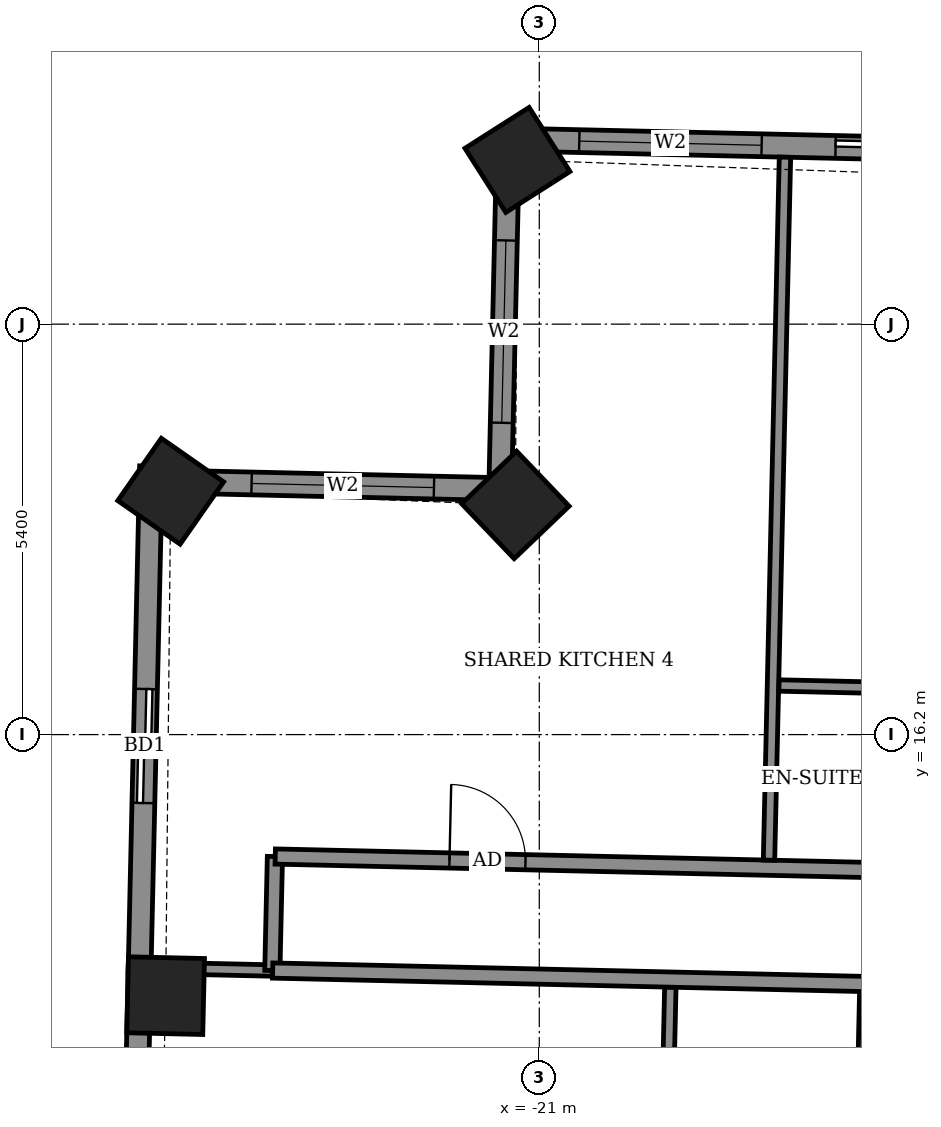
"""IFC4 building model, lengths in metres.
Left out: names, types, materials, properties, quantities, classifications, styles, units other than length and angle.
Written with IfcOpenShell. Run it as: python <this file> out.ifc"""

import sys

from ifc_helpers import new_model, si_unit, direction, frame, frame_2d, origin, origin_2d, place, context, subcontext, project, spatial, rectangle, extrude, element, fill, save


model = new_model("IFC4")
c1 = context("Model", 3, precision=1e-05, world=origin(), true_north=direction((0.0, 1.0)))
c2 = subcontext(c1, "Body", "Model", "MODEL_VIEW")
j1 = project(units=[si_unit("LENGTHUNIT", "METRE"), si_unit("PLANEANGLEUNIT", "RADIAN")], contexts=[c1])
p1 = place(None, origin())
s1 = spatial("IfcSite", under=j1, at=p1, CompositionType="ELEMENT")
p2 = place(p1, origin())
s2 = spatial("IfcBuilding", under=s1, at=p2, CompositionType="ELEMENT")
p3 = place(p2, frame((0.0, 0.0, 271.7)))
s3 = spatial("IfcBuildingStorey", under=s2, at=p3, CompositionType="ELEMENT", Elevation=271.7)
for number, where, z_axis, x_axis in (
    (1, (-21.287, 23.76, -0.55), (0.0, 0.0, 1.0), (-0.843, -0.538, 0.0)),
    (2, (-21.314, 19.221, -0.55), (0.0, 0.0, 1.0), (-0.723, -0.691, 0.0)),
    (3, (-25.849, 19.402, -0.55), (0.0, 0.0, 1.0), (-0.573, -0.82, 0.0)),
    (4, (-25.916, 12.766, -0.55), (0.0, 0.0, 1.0), (-0.023, -1.0, 0.0)),
):
    element("IfcColumn", number, at=place(p3, frame(where, z_axis=z_axis, x_axis=x_axis)), inside=s3, PredefinedType="COLUMN", context=c2, shape_type="SweptSolid", body=[
        extrude(rectangle(XDim=1.0, YDim=1.0, at=origin_2d()), origin(), (0.0, 0.0, 1.0), 3.6),
    ])
p4 = place(p3, frame((26.35, 22.945, 0.0), z_axis=(0.0, 0.0, 1.0), x_axis=(-0.999742523712, 0.022691105788, 0.0)))
e5 = element("IfcWall", 5, at=p4, inside=s3, PredefinedType="SOLIDWALL", context=c2, shape_type="SweptSolid", body=[
    extrude(rectangle(XDim=47.771, YDim=0.3, at=frame_2d((23.886, 0.0))), origin(), (0.0, 0.0, 1.0), 2.55),
])
p5 = place(p4, frame((1.954, 0.0, 0.0)))
e6 = element("IfcOpeningElement", 6, at=p5, cuts=e5, PredefinedType="OPENING", context=c2, shape_type="SweptSolid", body=[
    extrude(rectangle(XDim=1.5, YDim=2.4, at=frame_2d((0.75, 1.2))), frame((0.0, 0.16, 0.0), z_axis=(0.0, -1.0, 0.0), x_axis=(1.0, 0.0, 0.0)), (0.0, 0.0, 1.0), 0.32),
])
p6 = place(p4, frame((7.37, 0.0, 0.0)))
e7 = element("IfcOpeningElement", 7, at=p6, cuts=e5, PredefinedType="OPENING", context=c2, shape_type="SweptSolid", body=[
    extrude(rectangle(XDim=1.5, YDim=2.4, at=frame_2d((0.75, 1.2))), frame((0.0, 0.16, 0.0), z_axis=(0.0, -1.0, 0.0), x_axis=(1.0, 0.0, 0.0)), (0.0, 0.0, 1.0), 0.32),
])
p7 = place(p4, frame((10.554, 0.0, 0.0)))
e8 = element("IfcOpeningElement", 8, at=p7, cuts=e5, PredefinedType="OPENING", context=c2, shape_type="SweptSolid", body=[
    extrude(rectangle(XDim=1.5, YDim=2.4, at=frame_2d((0.75, 1.2))), frame((0.0, 0.16, 0.0), z_axis=(0.0, -1.0, 0.0), x_axis=(1.0, 0.0, 0.0)), (0.0, 0.0, 1.0), 0.32),
])
p8 = place(p4, frame((15.104, 0.0, 0.0)))
e9 = element("IfcOpeningElement", 9, at=p8, cuts=e5, PredefinedType="OPENING", context=c2, shape_type="SweptSolid", body=[
    extrude(rectangle(XDim=1.5, YDim=2.4, at=frame_2d((0.75, 1.2))), frame((0.0, 0.16, 0.0), z_axis=(0.0, -1.0, 0.0), x_axis=(1.0, 0.0, 0.0)), (0.0, 0.0, 1.0), 0.32),
])
p9 = place(p4, frame((18.287, 0.0, 0.0)))
e10 = element("IfcOpeningElement", 10, at=p9, cuts=e5, PredefinedType="OPENING", context=c2, shape_type="SweptSolid", body=[
    extrude(rectangle(XDim=1.5, YDim=2.4, at=frame_2d((0.75, 1.2))), frame((0.0, 0.16, 0.0), z_axis=(0.0, -1.0, 0.0), x_axis=(1.0, 0.0, 0.0)), (0.0, 0.0, 1.0), 0.32),
])
p10 = place(p4, frame((23.622, 0.0, 0.0)))
e11 = element("IfcOpeningElement", 11, at=p10, cuts=e5, PredefinedType="OPENING", context=c2, shape_type="SweptSolid", body=[
    extrude(rectangle(XDim=1.5, YDim=2.4, at=frame_2d((0.75, 1.2))), frame((0.0, 0.16, 0.0), z_axis=(0.0, -1.0, 0.0), x_axis=(1.0, 0.0, 0.0)), (0.0, 0.0, 1.0), 0.32),
])
p11 = place(p4, frame((28.521, 0.0, 0.0)))
e12 = element("IfcOpeningElement", 12, at=p11, cuts=e5, PredefinedType="OPENING", context=c2, shape_type="SweptSolid", body=[
    extrude(rectangle(XDim=1.5, YDim=2.4, at=frame_2d((0.75, 1.2))), frame((0.0, 0.16, 0.0), z_axis=(0.0, -1.0, 0.0), x_axis=(1.0, 0.0, 0.0)), (0.0, 0.0, 1.0), 0.32),
])
p12 = place(p4, frame((31.705, 0.0, 0.0)))
e13 = element("IfcOpeningElement", 13, at=p12, cuts=e5, PredefinedType="OPENING", context=c2, shape_type="SweptSolid", body=[
    extrude(rectangle(XDim=1.5, YDim=2.4, at=frame_2d((0.75, 1.2))), frame((0.0, 0.16, 0.0), z_axis=(0.0, -1.0, 0.0), x_axis=(1.0, 0.0, 0.0)), (0.0, 0.0, 1.0), 0.32),
])
p13 = place(p4, frame((36.722, 0.0, 0.0)))
e14 = element("IfcOpeningElement", 14, at=p13, cuts=e5, PredefinedType="OPENING", context=c2, shape_type="SweptSolid", body=[
    extrude(rectangle(XDim=1.5, YDim=2.4, at=frame_2d((0.75, 1.2))), frame((0.0, 0.16, 0.0), z_axis=(0.0, -1.0, 0.0), x_axis=(1.0, 0.0, 0.0)), (0.0, 0.0, 1.0), 0.32),
])
p14 = place(p4, frame((41.963, 0.0, 0.0)))
e15 = element("IfcOpeningElement", 15, at=p14, cuts=e5, PredefinedType="OPENING", context=c2, shape_type="SweptSolid", body=[
    extrude(rectangle(XDim=1.5, YDim=2.4, at=frame_2d((0.75, 1.2))), frame((0.0, 0.16, 0.0), z_axis=(0.0, -1.0, 0.0), x_axis=(1.0, 0.0, 0.0)), (0.0, 0.0, 1.0), 0.32),
])
p15 = place(p4, frame((44.436, 0.0, 0.9)))
e16 = element("IfcOpeningElement", 16, at=p15, cuts=e5, PredefinedType="OPENING", context=c2, shape_type="SweptSolid", body=[
    extrude(rectangle(XDim=2.4, YDim=1.5, at=frame_2d((1.2, 0.75))), frame((0.0, 0.16, 0.0), z_axis=(0.0, -1.0, 0.0), x_axis=(1.0, 0.0, 0.0)), (0.0, 0.0, 1.0), 0.32),
])
p16 = place(p3, frame((-21.409, 24.029, 0.0), z_axis=(0.0, 0.0, 1.0), x_axis=(-0.022820258049, -0.999739584003, 0.0)))
e17 = element("IfcWall", 17, at=p16, inside=s3, PredefinedType="SOLIDWALL", context=c2, shape_type="SweptSolid", body=[
    extrude(rectangle(XDim=4.6, YDim=0.3, at=frame_2d((2.3, 0.0))), origin(), (0.0, 0.0, 1.0), 2.55),
])
p17 = place(p16, frame((1.328, 0.0, 0.9)))
e18 = element("IfcOpeningElement", 18, at=p17, cuts=e17, PredefinedType="OPENING", context=c2, shape_type="SweptSolid", body=[
    extrude(rectangle(XDim=2.4, YDim=1.5, at=frame_2d((1.2, 0.75))), frame((0.0, 0.16, 0.0), z_axis=(0.0, -1.0, 0.0), x_axis=(1.0, 0.0, 0.0)), (0.0, 0.0, 1.0), 0.32),
])
p18 = place(p3, frame((-21.243, 19.424, 0.0), z_axis=(0.0, 0.0, 1.0), x_axis=(-0.999745650672, 0.022552914718, 0.0)))
e19 = element("IfcWall", 19, at=p18, inside=s3, PredefinedType="SOLIDWALL", context=c2, shape_type="SweptSolid", body=[
    extrude(rectangle(XDim=4.871, YDim=0.3, at=frame_2d((2.436, 0.0))), origin(), (0.0, 0.0, 1.0), 2.55),
])
p19 = place(p18, frame((1.143, 0.0, 0.9)))
e20 = element("IfcOpeningElement", 20, at=p19, cuts=e19, PredefinedType="OPENING", context=c2, shape_type="SweptSolid", body=[
    extrude(rectangle(XDim=2.4, YDim=1.5, at=frame_2d((1.2, 0.75))), frame((0.0, 0.16, 0.0), z_axis=(0.0, -1.0, 0.0), x_axis=(1.0, 0.0, 0.0)), (0.0, 0.0, 1.0), 0.32),
])
p20 = place(p3, frame((-26.108, 19.732, 0.0), z_axis=(0.0, 0.0, 1.0), x_axis=(-0.022700699365, -0.999742305921, 0.0)))
e21 = element("IfcWall", 21, at=p20, inside=s3, PredefinedType="SOLIDWALL", context=c2, shape_type="SweptSolid", body=[
    extrude(rectangle(XDim=13.927, YDim=0.3, at=frame_2d((6.964, 0.0))), origin(), (0.0, 0.0, 1.0), 2.55),
])
p21 = place(p20, frame((2.933, 0.0, 0.0)))
e22 = element("IfcOpeningElement", 22, at=p21, cuts=e21, PredefinedType="OPENING", context=c2, shape_type="SweptSolid", body=[
    extrude(rectangle(XDim=1.5, YDim=2.4, at=frame_2d((0.75, 1.2))), frame((0.0, 0.16, 0.0), z_axis=(0.0, -1.0, 0.0), x_axis=(1.0, 0.0, 0.0)), (0.0, 0.0, 1.0), 0.32),
])
p22 = place(p20, frame((9.216, 0.0, 0.9)))
e23 = element("IfcOpeningElement", 23, at=p22, cuts=e21, PredefinedType="OPENING", context=c2, shape_type="SweptSolid", body=[
    extrude(rectangle(XDim=2.4, YDim=1.5, at=frame_2d((1.2, 0.75))), frame((0.0, 0.16, 0.0), z_axis=(0.0, -1.0, 0.0), x_axis=(1.0, 0.0, 0.0)), (0.0, 0.0, 1.0), 0.32),
])
p23 = place(p3, frame((-17.262, -12.525, 0.0), z_axis=(0.0, 0.0, 1.0), x_axis=(0.022706151961, 0.999742182097, 0.0)))
e24 = element("IfcWall", 24, at=p23, inside=s3, PredefinedType="PARTITIONING", context=c2, shape_type="SweptSolid", body=[
    extrude(rectangle(XDim=25.45, YDim=0.2, at=frame_2d((12.725, 0.0))), origin(), (0.0, 0.0, 1.0), 3.05),
])
p24 = place(p23, frame((19.913, 0.0, 0.0)))
e25 = element("IfcOpeningElement", 25, at=p24, cuts=e24, PredefinedType="OPENING", context=c2, shape_type="SweptSolid", body=[
    extrude(rectangle(XDim=1.0, YDim=2.1, at=frame_2d((0.5, 1.05))), frame((0.0, 0.11, 0.0), z_axis=(0.0, -1.0, 0.0), x_axis=(1.0, 0.0, 0.0)), (0.0, 0.0, 1.0), 0.22),
])
p25 = place(p23, frame((23.6, 0.0, 0.0)))
e26 = element("IfcOpeningElement", 26, at=p25, cuts=e24, PredefinedType="OPENING", context=c2, shape_type="SweptSolid", body=[
    extrude(rectangle(XDim=0.9, YDim=2.1, at=frame_2d((0.45, 1.05))), frame((0.0, 0.11, 0.0), z_axis=(0.0, -1.0, 0.0), x_axis=(1.0, 0.0, 0.0)), (0.0, 0.0, 1.0), 0.22),
])
p26 = place(p23, frame((14.325, 0.0, 0.0)))
e27 = element("IfcOpeningElement", 27, at=p26, cuts=e24, PredefinedType="OPENING", context=c2, shape_type="SweptSolid", body=[
    extrude(rectangle(XDim=1.0, YDim=2.1, at=frame_2d((0.5, 1.05))), frame((0.0, 0.11, 0.0), z_axis=(0.0, -1.0, 0.0), x_axis=(1.0, 0.0, 0.0)), (0.0, 0.0, 1.0), 0.22),
])
p27 = place(p23, frame((16.525, 0.0, 0.0)))
e28 = element("IfcOpeningElement", 28, at=p27, cuts=e24, PredefinedType="OPENING", context=c2, shape_type="SweptSolid", body=[
    extrude(rectangle(XDim=0.9, YDim=2.1, at=frame_2d((0.45, 1.05))), frame((0.0, 0.11, 0.0), z_axis=(0.0, -1.0, 0.0), x_axis=(1.0, 0.0, 0.0)), (0.0, 0.0, 1.0), 0.22),
])
p28 = place(p23, frame((9.85, 0.0, 0.0)))
e29 = element("IfcOpeningElement", 29, at=p28, cuts=e24, PredefinedType="OPENING", context=c2, shape_type="SweptSolid", body=[
    extrude(rectangle(XDim=1.0, YDim=2.1, at=frame_2d((0.5, 1.05))), frame((0.0, 0.11, 0.0), z_axis=(0.0, -1.0, 0.0), x_axis=(1.0, 0.0, 0.0)), (0.0, 0.0, 1.0), 0.22),
])
p29 = place(p23, frame((12.125, 0.0, 0.0)))
e30 = element("IfcOpeningElement", 30, at=p29, cuts=e24, PredefinedType="OPENING", context=c2, shape_type="SweptSolid", body=[
    extrude(rectangle(XDim=0.9, YDim=2.1, at=frame_2d((0.45, 1.05))), frame((0.0, 0.11, 0.0), z_axis=(0.0, -1.0, 0.0), x_axis=(1.0, 0.0, 0.0)), (0.0, 0.0, 1.0), 0.22),
])
p30 = place(p23, frame((7.725, 0.0, 0.0)))
e31 = element("IfcOpeningElement", 31, at=p30, cuts=e24, PredefinedType="OPENING", context=c2, shape_type="SweptSolid", body=[
    extrude(rectangle(XDim=1.0, YDim=2.1, at=frame_2d((0.5, 1.05))), frame((0.0, 0.11, 0.0), z_axis=(0.0, -1.0, 0.0), x_axis=(1.0, 0.0, 0.0)), (0.0, 0.0, 1.0), 0.22),
])
p31 = place(p23, frame((5.275, 0.0, 0.0)))
e32 = element("IfcOpeningElement", 32, at=p31, cuts=e24, PredefinedType="OPENING", context=c2, shape_type="SweptSolid", body=[
    extrude(rectangle(XDim=0.9, YDim=2.1, at=frame_2d((0.45, 1.05))), frame((0.0, 0.11, 0.0), z_axis=(0.0, -1.0, 0.0), x_axis=(1.0, 0.0, 0.0)), (0.0, 0.0, 1.0), 0.22),
])
p32 = place(p23, frame((0.512, 0.0, 0.0)))
e33 = element("IfcOpeningElement", 33, at=p32, cuts=e24, PredefinedType="OPENING", context=c2, shape_type="SweptSolid", body=[
    extrude(rectangle(XDim=1.0, YDim=2.1, at=frame_2d((0.5, 1.05))), frame((0.0, 0.11, 0.0), z_axis=(0.0, -1.0, 0.0), x_axis=(1.0, 0.0, 0.0)), (0.0, 0.0, 1.0), 0.22),
])
p33 = place(p23, frame((2.775, 0.0, 0.0)))
e34 = element("IfcOpeningElement", 34, at=p33, cuts=e24, PredefinedType="OPENING", context=c2, shape_type="SweptSolid", body=[
    extrude(rectangle(XDim=0.9, YDim=2.1, at=frame_2d((0.45, 1.05))), frame((0.0, 0.11, 0.0), z_axis=(0.0, -1.0, 0.0), x_axis=(1.0, 0.0, 0.0)), (0.0, 0.0, 1.0), 0.22),
])
p34 = place(p3, frame((-19.337, 10.178, 0.0), z_axis=(0.0, 0.0, 1.0), x_axis=(0.02260842146, 0.999744396973, 0.0)))
e35 = element("IfcWall", 35, at=p34, inside=s3, PredefinedType="PARTITIONING", context=c2, shape_type="SweptSolid", body=[
    extrude(rectangle(XDim=2.7, YDim=0.15, at=frame_2d((1.35, 0.0))), origin(), (0.0, 0.0, 1.0), 3.05),
])
p35 = place(p3, frame((-26.408, 13.139, 0.0), z_axis=(0.0, 0.0, 1.0), x_axis=(0.999745462568, -0.022561251624, 0.0)))
e36 = element("IfcWall", 36, at=p35, inside=s3, PredefinedType="PARTITIONING", context=c2, shape_type="SweptSolid", body=[
    extrude(rectangle(XDim=1.905, YDim=0.15, at=frame_2d((0.952, 0.0))), origin(), (0.0, 0.0, 1.0), 3.05),
])
p36 = place(p3, frame((-24.512, 13.096, 0.0), z_axis=(0.0, 0.0, 1.0), x_axis=(0.022617910375, 0.999744182344, 0.0)))
e37 = element("IfcWall", 37, at=p36, inside=s3, PredefinedType="PARTITIONING", context=c2, shape_type="SweptSolid", body=[
    extrude(rectangle(XDim=1.5, YDim=0.2, at=frame_2d((0.75, 0.0))), origin(), (0.0, 0.0, 1.0), 3.05),
])
p37 = place(p3, frame((-24.508, 13.096, 0.0), z_axis=(0.0, 0.0, 1.0), x_axis=(0.99974170677, -0.022727070732, 0.0)))
e38 = element("IfcWall", 38, at=p37, inside=s3, PredefinedType="PARTITIONING", context=c2, shape_type="SweptSolid", body=[
    extrude(rectangle(XDim=7.831, YDim=0.2, at=frame_2d((3.916, 0.0))), origin(), (0.0, 0.0, 1.0), 3.05),
])
p38 = place(p3, frame((-24.474, 14.596, 0.0), z_axis=(0.0, 0.0, 1.0), x_axis=(0.999742424031, -0.022695497208, 0.0)))
e39 = element("IfcWall", 39, at=p38, inside=s3, PredefinedType="PARTITIONING", context=c2, shape_type="SweptSolid", body=[
    extrude(rectangle(XDim=52.872, YDim=0.2, at=frame_2d((26.436, 0.0))), origin(), (0.0, 0.0, 1.0), 3.05),
])
p39 = place(p38, frame((51.161, 0.0, 0.0)))
e40 = element("IfcOpeningElement", 40, at=p39, cuts=e39, PredefinedType="OPENING", context=c2, shape_type="SweptSolid", body=[
    extrude(rectangle(XDim=1.0, YDim=2.1, at=frame_2d((0.5, 1.05))), frame((0.0, 0.11, 0.0), z_axis=(0.0, -1.0, 0.0), x_axis=(1.0, 0.0, 0.0)), (0.0, 0.0, 1.0), 0.22),
])
p40 = place(p38, frame((46.7, 0.0, 0.0)))
e41 = element("IfcOpeningElement", 41, at=p40, cuts=e39, PredefinedType="OPENING", context=c2, shape_type="SweptSolid", body=[
    extrude(rectangle(XDim=0.9, YDim=2.1, at=frame_2d((0.45, 1.05))), frame((0.0, 0.11, 0.0), z_axis=(0.0, -1.0, 0.0), x_axis=(1.0, 0.0, 0.0)), (0.0, 0.0, 1.0), 0.22),
])
p41 = place(p38, frame((44.3, 0.0, 0.0)))
e42 = element("IfcOpeningElement", 42, at=p41, cuts=e39, PredefinedType="OPENING", context=c2, shape_type="SweptSolid", body=[
    extrude(rectangle(XDim=0.9, YDim=2.1, at=frame_2d((0.45, 1.05))), frame((0.0, 0.11, 0.0), z_axis=(0.0, -1.0, 0.0), x_axis=(1.0, 0.0, 0.0)), (0.0, 0.0, 1.0), 0.22),
])
p42 = place(p38, frame((37.575, 0.0, 0.0)))
e43 = element("IfcOpeningElement", 43, at=p42, cuts=e39, PredefinedType="OPENING", context=c2, shape_type="SweptSolid", body=[
    extrude(rectangle(XDim=0.9, YDim=2.1, at=frame_2d((0.45, 1.05))), frame((0.0, 0.11, 0.0), z_axis=(0.0, -1.0, 0.0), x_axis=(1.0, 0.0, 0.0)), (0.0, 0.0, 1.0), 0.22),
])
p43 = place(p38, frame((35.675, 0.0, 0.0)))
e44 = element("IfcOpeningElement", 44, at=p43, cuts=e39, PredefinedType="OPENING", context=c2, shape_type="SweptSolid", body=[
    extrude(rectangle(XDim=0.9, YDim=2.1, at=frame_2d((0.45, 1.05))), frame((0.0, 0.11, 0.0), z_axis=(0.0, -1.0, 0.0), x_axis=(1.0, 0.0, 0.0)), (0.0, 0.0, 1.0), 0.22),
])
p44 = place(p38, frame((28.95, 0.0, 0.0)))
e45 = element("IfcOpeningElement", 45, at=p44, cuts=e39, PredefinedType="OPENING", context=c2, shape_type="SweptSolid", body=[
    extrude(rectangle(XDim=0.9, YDim=2.1, at=frame_2d((0.45, 1.05))), frame((0.0, 0.11, 0.0), z_axis=(0.0, -1.0, 0.0), x_axis=(1.0, 0.0, 0.0)), (0.0, 0.0, 1.0), 0.22),
])
p45 = place(p38, frame((27.0, 0.0, 0.0)))
e46 = element("IfcOpeningElement", 46, at=p45, cuts=e39, PredefinedType="OPENING", context=c2, shape_type="SweptSolid", body=[
    extrude(rectangle(XDim=0.9, YDim=2.1, at=frame_2d((0.45, 1.05))), frame((0.0, 0.11, 0.0), z_axis=(0.0, -1.0, 0.0), x_axis=(1.0, 0.0, 0.0)), (0.0, 0.0, 1.0), 0.22),
])
p46 = place(p38, frame((20.2, 0.0, 0.0)))
e47 = element("IfcOpeningElement", 47, at=p46, cuts=e39, PredefinedType="OPENING", context=c2, shape_type="SweptSolid", body=[
    extrude(rectangle(XDim=0.9, YDim=2.1, at=frame_2d((0.45, 1.05))), frame((0.0, 0.11, 0.0), z_axis=(0.0, -1.0, 0.0), x_axis=(1.0, 0.0, 0.0)), (0.0, 0.0, 1.0), 0.22),
])
p47 = place(p38, frame((18.25, 0.0, 0.0)))
e48 = element("IfcOpeningElement", 48, at=p47, cuts=e39, PredefinedType="OPENING", context=c2, shape_type="SweptSolid", body=[
    extrude(rectangle(XDim=0.9, YDim=2.1, at=frame_2d((0.45, 1.05))), frame((0.0, 0.11, 0.0), z_axis=(0.0, -1.0, 0.0), x_axis=(1.0, 0.0, 0.0)), (0.0, 0.0, 1.0), 0.22),
])
p48 = place(p38, frame((11.5, 0.0, 0.0)))
e49 = element("IfcOpeningElement", 49, at=p48, cuts=e39, PredefinedType="OPENING", context=c2, shape_type="SweptSolid", body=[
    extrude(rectangle(XDim=0.9, YDim=2.1, at=frame_2d((0.45, 1.05))), frame((0.0, 0.11, 0.0), z_axis=(0.0, -1.0, 0.0), x_axis=(1.0, 0.0, 0.0)), (0.0, 0.0, 1.0), 0.22),
])
p49 = place(p38, frame((9.475, 0.0, 0.0)))
e50 = element("IfcOpeningElement", 50, at=p49, cuts=e39, PredefinedType="OPENING", context=c2, shape_type="SweptSolid", body=[
    extrude(rectangle(XDim=0.9, YDim=2.1, at=frame_2d((0.45, 1.05))), frame((0.0, 0.11, 0.0), z_axis=(0.0, -1.0, 0.0), x_axis=(1.0, 0.0, 0.0)), (0.0, 0.0, 1.0), 0.22),
])
p50 = place(p38, frame((2.293, 0.0, 0.0)))
e51 = element("IfcOpeningElement", 51, at=p50, cuts=e39, PredefinedType="OPENING", context=c2, shape_type="SweptSolid", body=[
    extrude(rectangle(XDim=1.0, YDim=2.1, at=frame_2d((0.5, 1.05))), frame((0.0, 0.11, 0.0), z_axis=(0.0, -1.0, 0.0), x_axis=(1.0, 0.0, 0.0)), (0.0, 0.0, 1.0), 0.22),
])
p51 = place(p3, frame((-17.978, 14.548, 0.0), z_axis=(0.0, 0.0, 1.0), x_axis=(0.022698023584, 0.999742366675, 0.0)))
e52 = element("IfcWall", 52, at=p51, inside=s3, PredefinedType="PARTITIONING", context=c2, shape_type="SweptSolid", body=[
    extrude(rectangle(XDim=9.25, YDim=0.15, at=frame_2d((4.625, 0.0))), origin(), (0.0, 0.0, 1.0), 2.55),
])
p52 = place(p3, frame((-17.846, 16.846, 0.0), z_axis=(0.0, 0.0, 1.0), x_axis=(0.999740260747, -0.02279059109, 0.0)))
e53 = element("IfcWall", 53, at=p52, inside=s3, PredefinedType="PARTITIONING", context=c2, shape_type="SweptSolid", body=[
    extrude(rectangle(XDim=2.324, YDim=0.15, at=frame_2d((1.162, 0.0))), origin(), (0.0, 0.0, 1.0), 3.05),
])
p53 = place(p14, origin())
e54 = element("IfcDoor", 54, at=p53, inside=s3, OperationType="SLIDING_TO_LEFT", PredefinedType="DOOR", context=c2, shape_type="SweptSolid", body=[
    extrude(rectangle(XDim=1.5, YDim=2.4, at=frame_2d((0.75, 1.2))), frame((0.0, 0.025, 0.0), z_axis=(0.0, -1.0, 0.0), x_axis=(1.0, 0.0, 0.0)), (0.0, 0.0, 1.0), 0.05),
])
fill(e15, e54)
p54 = place(p15, origin())
e55 = element("IfcWindow", 55, at=p54, inside=s3, PartitioningType="DOUBLE_PANEL_VERTICAL", PredefinedType="WINDOW", context=c2, shape_type="SweptSolid", body=[
    extrude(rectangle(XDim=2.4, YDim=1.5, at=frame_2d((1.2, 0.75))), frame((0.0, 0.03, 0.0), z_axis=(0.0, -1.0, 0.0), x_axis=(1.0, 0.0, 0.0)), (0.0, 0.0, 1.0), 0.06),
])
fill(e16, e55)
p55 = place(p17, origin())
e56 = element("IfcWindow", 56, at=p55, inside=s3, PartitioningType="DOUBLE_PANEL_VERTICAL", PredefinedType="WINDOW", context=c2, shape_type="SweptSolid", body=[
    extrude(rectangle(XDim=2.4, YDim=1.5, at=frame_2d((1.2, 0.75))), frame((0.0, 0.03, 0.0), z_axis=(0.0, -1.0, 0.0), x_axis=(1.0, 0.0, 0.0)), (0.0, 0.0, 1.0), 0.06),
])
fill(e18, e56)
p56 = place(p19, origin())
e57 = element("IfcWindow", 57, at=p56, inside=s3, PartitioningType="DOUBLE_PANEL_VERTICAL", PredefinedType="WINDOW", context=c2, shape_type="SweptSolid", body=[
    extrude(rectangle(XDim=2.4, YDim=1.5, at=frame_2d((1.2, 0.75))), frame((0.0, 0.03, 0.0), z_axis=(0.0, -1.0, 0.0), x_axis=(1.0, 0.0, 0.0)), (0.0, 0.0, 1.0), 0.06),
])
fill(e20, e57)
p57 = place(p21, origin())
e58 = element("IfcDoor", 58, at=p57, inside=s3, OperationType="SLIDING_TO_LEFT", PredefinedType="DOOR", context=c2, shape_type="SweptSolid", body=[
    extrude(rectangle(XDim=1.5, YDim=2.4, at=frame_2d((0.75, 1.2))), frame((0.0, 0.025, 0.0), z_axis=(0.0, -1.0, 0.0), x_axis=(1.0, 0.0, 0.0)), (0.0, 0.0, 1.0), 0.05),
])
fill(e22, e58)
p58 = place(p50, origin())
e59 = element("IfcDoor", 59, at=p58, inside=s3, OperationType="SINGLE_SWING_RIGHT", PredefinedType="DOOR", context=c2, shape_type="SweptSolid", body=[
    extrude(rectangle(XDim=1.0, YDim=2.1, at=frame_2d((0.5, 1.05))), frame((0.0, 0.025, 0.0), z_axis=(0.0, -1.0, 0.0), x_axis=(1.0, 0.0, 0.0)), (0.0, 0.0, 1.0), 0.05),
])
fill(e51, e59)
save(model, sys.argv[1])
